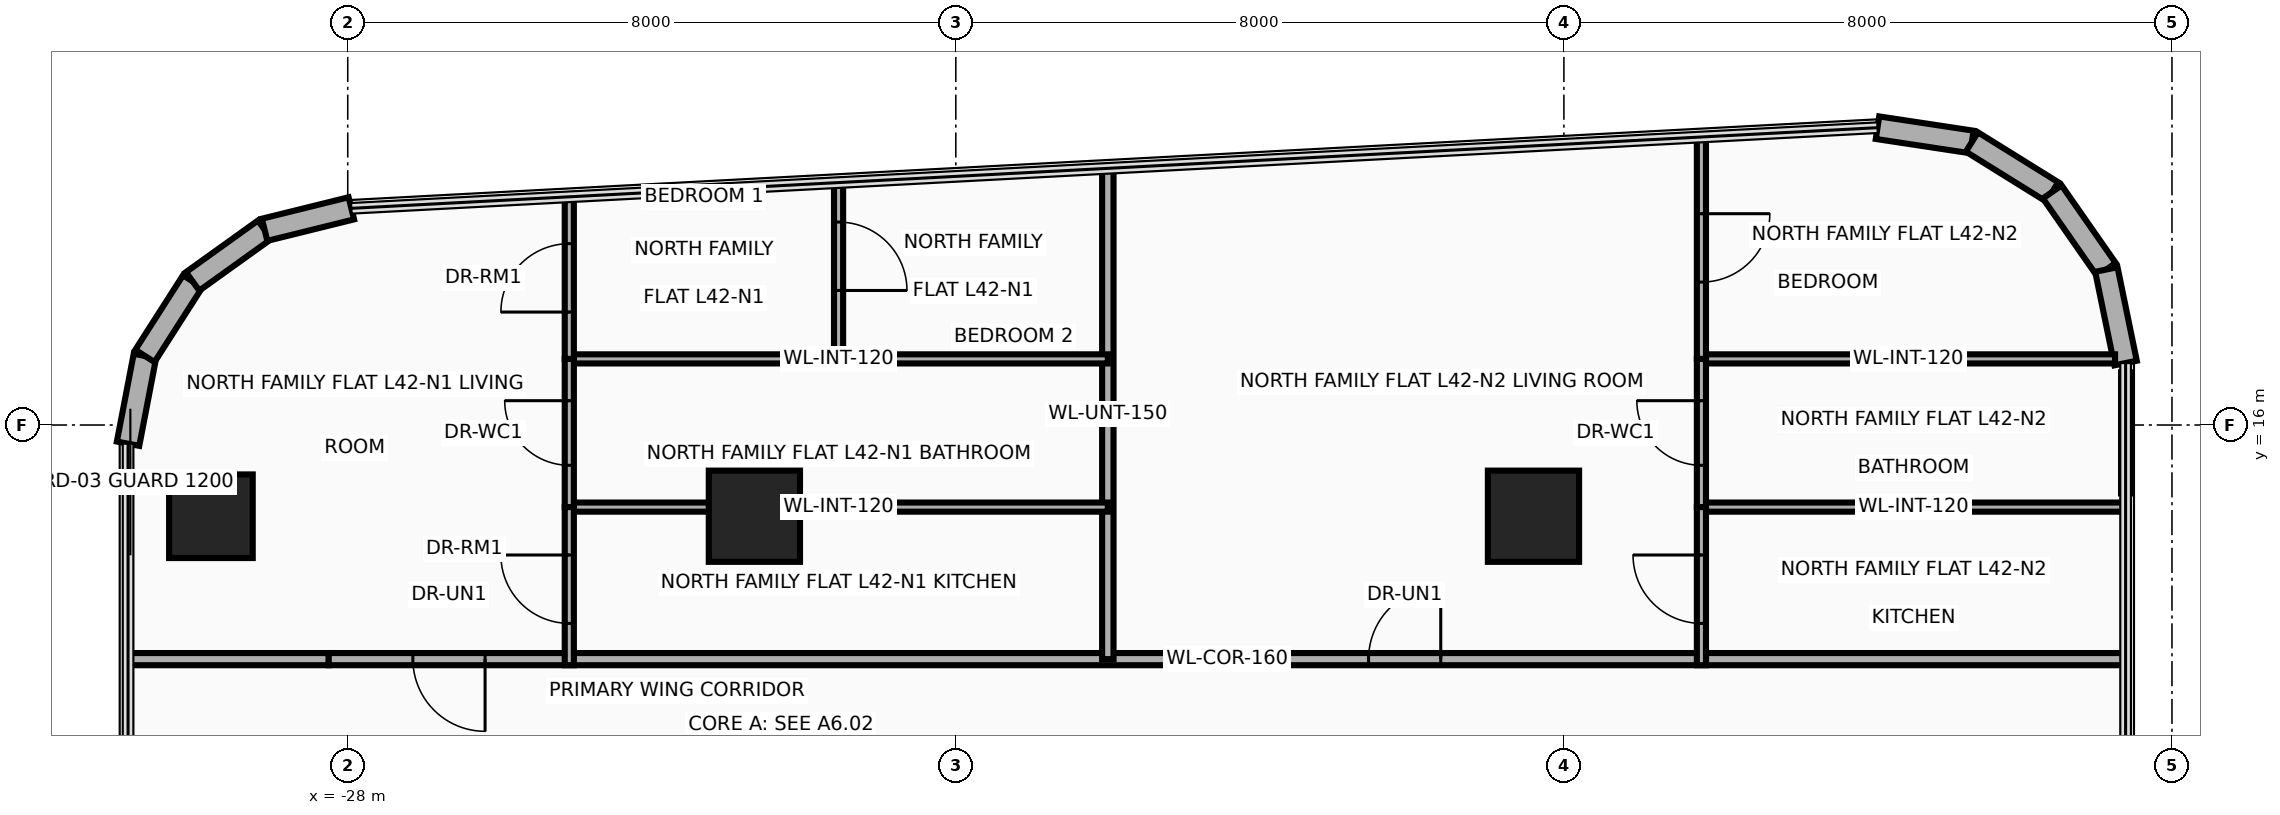
"""IFC4 building model, lengths in metres.
Left out: names, types, materials, properties, quantities, classifications, styles, units other than length and angle.
Written with IfcOpenShell. Run it as: python <this file> out.ifc"""

import sys

from ifc_helpers import new_model, si_unit, direction, frame, frame_2d, origin, origin_2d, place, context, subcontext, project, spatial, rectangle, circle, extrude, source, transform, mapped, element, fill, save


model = new_model("IFC4")
c1 = context("Model", 3, precision=1e-05, world=origin(), true_north=direction((0.0, 1.0)))
c2 = subcontext(c1, "Body", "Model", "MODEL_VIEW")
j1 = project(units=[si_unit("LENGTHUNIT", "METRE"), si_unit("PLANEANGLEUNIT", "RADIAN")], contexts=[c1])
p1 = place(None, origin())
s1 = spatial("IfcSite", under=j1, at=p1, CompositionType="ELEMENT")
p2 = place(p1, origin())
s2 = spatial("IfcBuilding", under=s1, at=p2, CompositionType="ELEMENT")
p3 = place(p2, frame((0.0, 0.0, 164.9)))
s3 = spatial("IfcBuildingStorey", under=s2, at=p3, CompositionType="ELEMENT", Elevation=164.9)
m1 = source(origin(), c2, "Body", "SweptSolid", [
    extrude(circle(Radius=0.55, at=origin_2d()), origin(), (0.0, 0.0, 1.0), 3.7),
])
p4 = place(p3, frame((-29.8, 14.8, 0.0), z_axis=(0.0, 0.0, 1.0), x_axis=(1.0, 0.0, 0.0)))
e1 = element("IfcColumn", 1, at=p4, inside=s3, PredefinedType="COLUMN", context=c2, shape_type="MappedRepresentation", body=[
    mapped(m1, transform((0.0, 0.0, 0.0), x_axis=(1.0, 0.0, 0.0), y_axis=(0.0, 1.0, 0.0), z_axis=(0.0, 0.0, 1.0), scale=1.0)),
])
m2 = source(origin(), c2, "Body", "SweptSolid", [
    extrude(rectangle(XDim=1.2, YDim=1.2, at=origin_2d()), origin(), (0.0, 0.0, 1.0), 3.7),
])
for number, where, z_axis, x_axis in (
    (2, (-22.65, 14.8, 0.0), (0.0, 0.0, 1.0), (1.0, 0.0, 0.0)),
    (3, (-12.4, 14.8, 0.0), (0.0, 0.0, 1.0), (1.0, 0.0, 0.0)),
):
    element("IfcColumn", number, at=place(p3, frame(where, z_axis=z_axis, x_axis=x_axis)), inside=s3, PredefinedType="COLUMN", context=c2, shape_type="MappedRepresentation", body=[
        mapped(m2, transform((0.0, 0.0, 0.0), x_axis=(1.0, 0.0, 0.0), y_axis=(0.0, 1.0, 0.0), z_axis=(0.0, 0.0, 1.0), scale=1.0)),
    ])
p5 = place(p3, frame((-30.89, 15.754, 0.0), z_axis=(0.0, 0.0, 1.0), x_axis=(0.188562397879, 0.982061210977, 0.0)))
e4 = element("IfcWall", 4, at=p5, inside=s3, PredefinedType="SOLIDWALL", context=c2, shape_type="SweptSolid", body=[
    extrude(rectangle(XDim=1.176, YDim=0.3, at=frame_2d((0.588, 0.0))), origin(), (0.0, 0.0, 1.0), 3.46),
])
for number, where, z_axis, x_axis in (
    (5, (-30.668, 16.909, 0.0), (0.0, 0.0, 1.0), (0.539, 0.842, 0.0)),
    (6, (-30.04, 17.89, 0.0), (0.0, 0.0, 1.0), (0.813, 0.583, 0.0)),
):
    element("IfcWall", number, at=place(p3, frame(where, z_axis=z_axis, x_axis=x_axis)), inside=s3, PredefinedType="SOLIDWALL", context=c2, shape_type="SweptSolid", body=[
        extrude(rectangle(XDim=1.165, YDim=0.3, at=frame_2d((0.583, 0.0))), origin(), (0.0, 0.0, 1.0), 3.46),
    ])
p6 = place(p3, frame((-29.094, 18.569, 0.0), z_axis=(0.0, 0.0, 1.0), x_axis=(0.970762249107, 0.24004302887, 0.0)))
e7 = element("IfcWall", 7, at=p6, inside=s3, PredefinedType="SOLIDWALL", context=c2, shape_type="SweptSolid", body=[
    extrude(rectangle(XDim=1.176, YDim=0.3, at=frame_2d((0.588, 0.0))), origin(), (0.0, 0.0, 1.0), 3.46),
])
p7 = place(p3, frame((-7.874, 19.912, 0.0), z_axis=(0.0, 0.0, 1.0), x_axis=(0.988741655411, -0.149632679769, 0.0)))
e8 = element("IfcWall", 8, at=p7, inside=s3, PredefinedType="SOLIDWALL", context=c2, shape_type="SweptSolid", body=[
    extrude(rectangle(XDim=1.256, YDim=0.3, at=frame_2d((0.628, 0.0))), origin(), (0.0, 0.0, 1.0), 3.46),
])
p8 = place(p3, frame((-6.632, 19.724, 0.0), z_axis=(0.0, 0.0, 1.0), x_axis=(0.849285325289, -0.527934121126, 0.0)))
e9 = element("IfcWall", 9, at=p8, inside=s3, PredefinedType="SOLIDWALL", context=c2, shape_type="SweptSolid", body=[
    extrude(rectangle(XDim=1.244, YDim=0.3, at=frame_2d((0.622, 0.0))), origin(), (0.0, 0.0, 1.0), 3.46),
])
p9 = place(p3, frame((-5.575, 19.067, 0.0), z_axis=(0.0, 0.0, 1.0), x_axis=(0.571960670617, -0.820281044074, 0.0)))
e10 = element("IfcWall", 10, at=p9, inside=s3, PredefinedType="SOLIDWALL", context=c2, shape_type="SweptSolid", body=[
    extrude(rectangle(XDim=1.245, YDim=0.3, at=frame_2d((0.622, 0.0))), origin(), (0.0, 0.0, 1.0), 3.46),
])
p10 = place(p3, frame((-4.863, 18.046, 0.0), z_axis=(0.0, 0.0, 1.0), x_axis=(0.201532282172, -0.97948187285, 0.0)))
e11 = element("IfcWall", 11, at=p10, inside=s3, PredefinedType="SOLIDWALL", context=c2, shape_type="SweptSolid", body=[
    extrude(rectangle(XDim=1.256, YDim=0.3, at=frame_2d((0.628, 0.0))), origin(), (0.0, 0.0, 1.0), 3.46),
])
p11 = place(p3, frame((-30.89, 12.92, 0.0), z_axis=(0.0, 0.0, 1.0), x_axis=(1.0, 0.0, 0.0)))
e12 = element("IfcWall", 12, at=p11, inside=s3, PredefinedType="PARTITIONING", context=c2, shape_type="SweptSolid", body=[
    extrude(rectangle(XDim=2.64, YDim=0.16, at=frame_2d((1.32, 0.0))), origin(), (0.0, 0.0, 1.0), 2.896),
])
p12 = place(p3, frame((-28.25, 12.92, 0.0), z_axis=(0.0, 0.0, 1.0), x_axis=(1.0, 0.0, 0.0)))
e13 = element("IfcWall", 13, at=p12, inside=s3, PredefinedType="PARTITIONING", context=c2, shape_type="SweptSolid", body=[
    extrude(rectangle(XDim=23.64, YDim=0.16, at=frame_2d((11.82, 0.0))), origin(), (0.0, 0.0, 1.0), 2.834),
])
p13 = place(p12, frame((1.107, 0.0, 0.0)))
e14 = element("IfcOpeningElement", 14, at=p13, cuts=e13, PredefinedType="OPENING", context=c2, shape_type="SweptSolid", body=[
    extrude(rectangle(XDim=0.95, YDim=2.15, at=frame_2d((0.475, 1.075))), frame((0.0, 0.095, 0.0), z_axis=(0.0, -1.0, 0.0), x_axis=(1.0, 0.0, 0.0)), (0.0, 0.0, 1.0), 0.19),
])
p14 = place(p12, frame((13.68, 0.0, 0.0)))
e15 = element("IfcOpeningElement", 15, at=p14, cuts=e13, PredefinedType="OPENING", context=c2, shape_type="SweptSolid", body=[
    extrude(rectangle(XDim=0.95, YDim=2.15, at=frame_2d((0.475, 1.075))), frame((0.0, 0.095, 0.0), z_axis=(0.0, -1.0, 0.0), x_axis=(1.0, 0.0, 0.0)), (0.0, 0.0, 1.0), 0.19),
])
p15 = place(p3, frame((-18.0, 12.92, 0.0), z_axis=(0.0, 0.0, 1.0), x_axis=(0.0, 1.0, 0.0)))
e16 = element("IfcWall", 16, at=p15, inside=s3, PredefinedType="PARTITIONING", context=c2, shape_type="SweptSolid", body=[
    extrude(rectangle(XDim=6.457, YDim=0.15, at=frame_2d((3.229, 0.0))), origin(), (0.0, 0.0, 1.0), 2.666),
])
p16 = place(p3, frame((-25.085, 14.92, 0.0), z_axis=(0.0, 0.0, 1.0), x_axis=(1.0, 0.0, 0.0)))
e17 = element("IfcWall", 17, at=p16, inside=s3, PredefinedType="PARTITIONING", context=c2, shape_type="SweptSolid", body=[
    extrude(rectangle(XDim=7.085, YDim=0.12, at=frame_2d((3.542, 0.0))), origin(), (0.0, 0.0, 1.0), 2.666),
])
p17 = place(p3, frame((-25.085, 16.87, 0.0), z_axis=(0.0, 0.0, 1.0), x_axis=(1.0, 0.0, 0.0)))
e18 = element("IfcWall", 18, at=p17, inside=s3, PredefinedType="PARTITIONING", context=c2, shape_type="SweptSolid", body=[
    extrude(rectangle(XDim=7.085, YDim=0.12, at=frame_2d((3.542, 0.0))), origin(), (0.0, 0.0, 1.0), 3.46),
])
p18 = place(p3, frame((-25.085, 14.92, 0.0), z_axis=(0.0, 0.0, 1.0), x_axis=(0.0, 1.0, 0.0)))
e19 = element("IfcWall", 19, at=p18, inside=s3, PredefinedType="PARTITIONING", context=c2, shape_type="SweptSolid", body=[
    extrude(rectangle(XDim=1.95, YDim=0.12, at=frame_2d((0.975, 0.0))), origin(), (0.0, 0.0, 1.0), 2.666),
])
p19 = place(p18, frame((0.55, 0.0, 0.0)))
e20 = element("IfcOpeningElement", 20, at=p19, cuts=e19, PredefinedType="OPENING", context=c2, shape_type="SweptSolid", body=[
    extrude(rectangle(XDim=0.85, YDim=2.1, at=frame_2d((0.425, 1.05))), frame((0.0, 0.075, 0.0), z_axis=(0.0, -1.0, 0.0), x_axis=(1.0, 0.0, 0.0)), (0.0, 0.0, 1.0), 0.15),
])
p20 = place(p3, frame((-25.085, 12.84, 0.0), z_axis=(0.0, 0.0, 1.0), x_axis=(0.0, 1.0, 0.0)))
e21 = element("IfcWall", 21, at=p20, inside=s3, PredefinedType="PARTITIONING", context=c2, shape_type="SweptSolid", body=[
    extrude(rectangle(XDim=2.08, YDim=0.12, at=frame_2d((1.04, 0.0))), origin(), (0.0, 0.0, 1.0), 2.666),
])
p21 = place(p20, frame((0.55, 0.0, 0.0)))
e22 = element("IfcOpeningElement", 22, at=p21, cuts=e21, PredefinedType="OPENING", context=c2, shape_type="SweptSolid", body=[
    extrude(rectangle(XDim=0.9, YDim=2.1, at=frame_2d((0.45, 1.05))), frame((0.0, 0.075, 0.0), z_axis=(0.0, -1.0, 0.0), x_axis=(1.0, 0.0, 0.0)), (0.0, 0.0, 1.0), 0.15),
])
p22 = place(p3, frame((-25.085, 16.87, 0.0), z_axis=(0.0, 0.0, 1.0), x_axis=(0.0, 1.0, 0.0)))
e23 = element("IfcWall", 23, at=p22, inside=s3, PredefinedType="PARTITIONING", context=c2, shape_type="SweptSolid", body=[
    extrude(rectangle(XDim=2.132, YDim=0.12, at=frame_2d((1.066, 0.0))), origin(), (0.0, 0.0, 1.0), 3.46),
])
p23 = place(p22, frame((0.616, 0.0, 0.0)))
e24 = element("IfcOpeningElement", 24, at=p23, cuts=e23, PredefinedType="OPENING", context=c2, shape_type="SweptSolid", body=[
    extrude(rectangle(XDim=0.9, YDim=2.1, at=frame_2d((0.45, 1.05))), frame((0.0, 0.075, 0.0), z_axis=(0.0, -1.0, 0.0), x_axis=(1.0, 0.0, 0.0)), (0.0, 0.0, 1.0), 0.15),
])
p24 = place(p3, frame((-21.542, 16.87, 0.0), z_axis=(0.0, 0.0, 1.0), x_axis=(0.0, 1.0, 0.0)))
e25 = element("IfcWall", 25, at=p24, inside=s3, PredefinedType="PARTITIONING", context=c2, shape_type="SweptSolid", body=[
    extrude(rectangle(XDim=2.319, YDim=0.12, at=frame_2d((1.16, 0.0))), origin(), (0.0, 0.0, 1.0), 3.46),
])
p25 = place(p24, frame((0.9, 0.0, 0.0)))
e26 = element("IfcOpeningElement", 26, at=p25, cuts=e25, PredefinedType="OPENING", context=c2, shape_type="SweptSolid", body=[
    extrude(rectangle(XDim=0.9, YDim=2.1, at=frame_2d((0.45, 1.05))), frame((0.0, 0.075, 0.0), z_axis=(0.0, -1.0, 0.0), x_axis=(1.0, 0.0, 0.0)), (0.0, 0.0, 1.0), 0.15),
])
p26 = place(p3, frame((-10.191, 14.92, 0.0), z_axis=(0.0, 0.0, 1.0), x_axis=(1.0, 0.0, 0.0)))
e27 = element("IfcWall", 27, at=p26, inside=s3, PredefinedType="PARTITIONING", context=c2, shape_type="SweptSolid", body=[
    extrude(rectangle(XDim=5.581, YDim=0.12, at=frame_2d((2.79, 0.0))), origin(), (0.0, 0.0, 1.0), 3.46),
])
p27 = place(p3, frame((-10.191, 16.87, 0.0), z_axis=(0.0, 0.0, 1.0), x_axis=(1.0, 0.0, 0.0)))
e28 = element("IfcWall", 28, at=p27, inside=s3, PredefinedType="PARTITIONING", context=c2, shape_type="SweptSolid", body=[
    extrude(rectangle(XDim=5.442, YDim=0.12, at=frame_2d((2.721, 0.0))), origin(), (0.0, 0.0, 1.0), 3.46),
])
p28 = place(p3, frame((-10.191, 14.92, 0.0), z_axis=(0.0, 0.0, 1.0), x_axis=(0.0, 1.0, 0.0)))
e29 = element("IfcWall", 29, at=p28, inside=s3, PredefinedType="PARTITIONING", context=c2, shape_type="SweptSolid", body=[
    extrude(rectangle(XDim=1.95, YDim=0.12, at=frame_2d((0.975, 0.0))), origin(), (0.0, 0.0, 1.0), 3.46),
])
p29 = place(p28, frame((0.55, 0.0, 0.0)))
e30 = element("IfcOpeningElement", 30, at=p29, cuts=e29, PredefinedType="OPENING", context=c2, shape_type="SweptSolid", body=[
    extrude(rectangle(XDim=0.85, YDim=2.1, at=frame_2d((0.425, 1.05))), frame((0.0, 0.075, 0.0), z_axis=(0.0, -1.0, 0.0), x_axis=(1.0, 0.0, 0.0)), (0.0, 0.0, 1.0), 0.15),
])
p30 = place(p3, frame((-10.191, 12.84, 0.0), z_axis=(0.0, 0.0, 1.0), x_axis=(0.0, 1.0, 0.0)))
e31 = element("IfcWall", 31, at=p30, inside=s3, PredefinedType="PARTITIONING", context=c2, shape_type="SweptSolid", body=[
    extrude(rectangle(XDim=2.08, YDim=0.12, at=frame_2d((1.04, 0.0))), origin(), (0.0, 0.0, 1.0), 3.46),
])
p31 = place(p30, frame((0.55, 0.0, 0.0)))
e32 = element("IfcOpeningElement", 32, at=p31, cuts=e31, PredefinedType="OPENING", context=c2, shape_type="SweptSolid", body=[
    extrude(rectangle(XDim=0.9, YDim=2.1, at=frame_2d((0.45, 1.05))), frame((0.0, 0.075, 0.0), z_axis=(0.0, -1.0, 0.0), x_axis=(1.0, 0.0, 0.0)), (0.0, 0.0, 1.0), 0.15),
])
p32 = place(p3, frame((-10.191, 16.87, 0.0), z_axis=(0.0, 0.0, 1.0), x_axis=(0.0, 1.0, 0.0)))
e33 = element("IfcWall", 33, at=p32, inside=s3, PredefinedType="PARTITIONING", context=c2, shape_type="SweptSolid", body=[
    extrude(rectangle(XDim=2.919, YDim=0.12, at=frame_2d((1.459, 0.0))), origin(), (0.0, 0.0, 1.0), 3.46),
])
p33 = place(p32, frame((1.01, 0.0, 0.0)))
e34 = element("IfcOpeningElement", 34, at=p33, cuts=e33, PredefinedType="OPENING", context=c2, shape_type="SweptSolid", body=[
    extrude(rectangle(XDim=0.9, YDim=2.1, at=frame_2d((0.45, 1.05))), frame((0.0, 0.075, 0.0), z_axis=(0.0, -1.0, 0.0), x_axis=(1.0, 0.0, 0.0)), (0.0, 0.0, 1.0), 0.15),
])
p34 = place(p3, frame((-4.61, 15.1, 0.0), z_axis=(0.0, 0.0, 1.0), x_axis=(0.0, 1.0, 0.0)))
e35 = element("IfcWall", 35, at=p34, inside=s3, PredefinedType="PARTITIONING", context=c2, shape_type="SweptSolid", body=[
    extrude(rectangle(XDim=1.593, YDim=0.12, at=frame_2d((0.796, 0.0))), origin(), (0.0, 0.0, 1.0), 3.46),
])
p35 = place(p13, frame((0.95, 0.0, 0.0), z_axis=(0.0, 0.0, 1.0), x_axis=(-1.0, 0.0, 0.0)))
e36 = element("IfcDoor", 36, at=p35, inside=s3, OperationType="SINGLE_SWING_LEFT", PredefinedType="DOOR", context=c2, shape_type="SweptSolid", body=[
    extrude(rectangle(XDim=0.95, YDim=2.15, at=frame_2d((0.475, 1.075))), frame((0.0, 0.025, 0.0), z_axis=(0.0, -1.0, 0.0), x_axis=(1.0, 0.0, 0.0)), (0.0, 0.0, 1.0), 0.05),
])
fill(e14, e36)
p36 = place(p19, origin())
e37 = element("IfcDoor", 37, at=p36, inside=s3, OperationType="SINGLE_SWING_RIGHT", PredefinedType="DOOR", context=c2, shape_type="SweptSolid", body=[
    extrude(rectangle(XDim=0.85, YDim=2.1, at=frame_2d((0.425, 1.05))), frame((0.0, 0.025, 0.0), z_axis=(0.0, -1.0, 0.0), x_axis=(1.0, 0.0, 0.0)), (0.0, 0.0, 1.0), 0.05),
])
fill(e20, e37)
p37 = place(p21, origin())
e38 = element("IfcDoor", 38, at=p37, inside=s3, OperationType="SINGLE_SWING_LEFT", PredefinedType="DOOR", context=c2, shape_type="SweptSolid", body=[
    extrude(rectangle(XDim=0.9, YDim=2.1, at=frame_2d((0.45, 1.05))), frame((0.0, 0.025, 0.0), z_axis=(0.0, -1.0, 0.0), x_axis=(1.0, 0.0, 0.0)), (0.0, 0.0, 1.0), 0.05),
])
fill(e22, e38)
p38 = place(p23, origin())
e39 = element("IfcDoor", 39, at=p38, inside=s3, OperationType="SINGLE_SWING_RIGHT", PredefinedType="DOOR", context=c2, shape_type="SweptSolid", body=[
    extrude(rectangle(XDim=0.9, YDim=2.1, at=frame_2d((0.45, 1.05))), frame((0.0, 0.025, 0.0), z_axis=(0.0, -1.0, 0.0), x_axis=(1.0, 0.0, 0.0)), (0.0, 0.0, 1.0), 0.05),
])
fill(e24, e39)
p39 = place(p25, frame((0.9, 0.0, 0.0), z_axis=(0.0, 0.0, 1.0), x_axis=(-1.0, 0.0, 0.0)))
e40 = element("IfcDoor", 40, at=p39, inside=s3, OperationType="SINGLE_SWING_LEFT", PredefinedType="DOOR", context=c2, shape_type="SweptSolid", body=[
    extrude(rectangle(XDim=0.9, YDim=2.1, at=frame_2d((0.45, 1.05))), frame((0.0, 0.025, 0.0), z_axis=(0.0, -1.0, 0.0), x_axis=(1.0, 0.0, 0.0)), (0.0, 0.0, 1.0), 0.05),
])
fill(e26, e40)
p40 = place(p14, origin())
e41 = element("IfcDoor", 41, at=p40, inside=s3, OperationType="SINGLE_SWING_RIGHT", PredefinedType="DOOR", context=c2, shape_type="SweptSolid", body=[
    extrude(rectangle(XDim=0.95, YDim=2.15, at=frame_2d((0.475, 1.075))), frame((0.0, 0.025, 0.0), z_axis=(0.0, -1.0, 0.0), x_axis=(1.0, 0.0, 0.0)), (0.0, 0.0, 1.0), 0.05),
])
fill(e15, e41)
p41 = place(p29, origin())
e42 = element("IfcDoor", 42, at=p41, inside=s3, OperationType="SINGLE_SWING_LEFT", PredefinedType="DOOR", context=c2, shape_type="SweptSolid", body=[
    extrude(rectangle(XDim=0.85, YDim=2.1, at=frame_2d((0.425, 1.05))), frame((0.0, 0.025, 0.0), z_axis=(0.0, -1.0, 0.0), x_axis=(1.0, 0.0, 0.0)), (0.0, 0.0, 1.0), 0.05),
])
fill(e30, e42)
p42 = place(p31, origin())
e43 = element("IfcDoor", 43, at=p42, inside=s3, OperationType="SINGLE_SWING_RIGHT", PredefinedType="DOOR", context=c2, shape_type="SweptSolid", body=[
    extrude(rectangle(XDim=0.9, YDim=2.1, at=frame_2d((0.45, 1.05))), frame((0.0, 0.025, 0.0), z_axis=(0.0, -1.0, 0.0), x_axis=(1.0, 0.0, 0.0)), (0.0, 0.0, 1.0), 0.05),
])
fill(e32, e43)
p43 = place(p33, frame((0.9, 0.0, 0.0), z_axis=(0.0, 0.0, 1.0), x_axis=(-1.0, 0.0, 0.0)))
e44 = element("IfcDoor", 44, at=p43, inside=s3, OperationType="SINGLE_SWING_LEFT", PredefinedType="DOOR", context=c2, shape_type="SweptSolid", body=[
    extrude(rectangle(XDim=0.9, YDim=2.1, at=frame_2d((0.45, 1.05))), frame((0.0, 0.025, 0.0), z_axis=(0.0, -1.0, 0.0), x_axis=(1.0, 0.0, 0.0)), (0.0, 0.0, 1.0), 0.05),
])
fill(e34, e44)
save(model, sys.argv[1])
